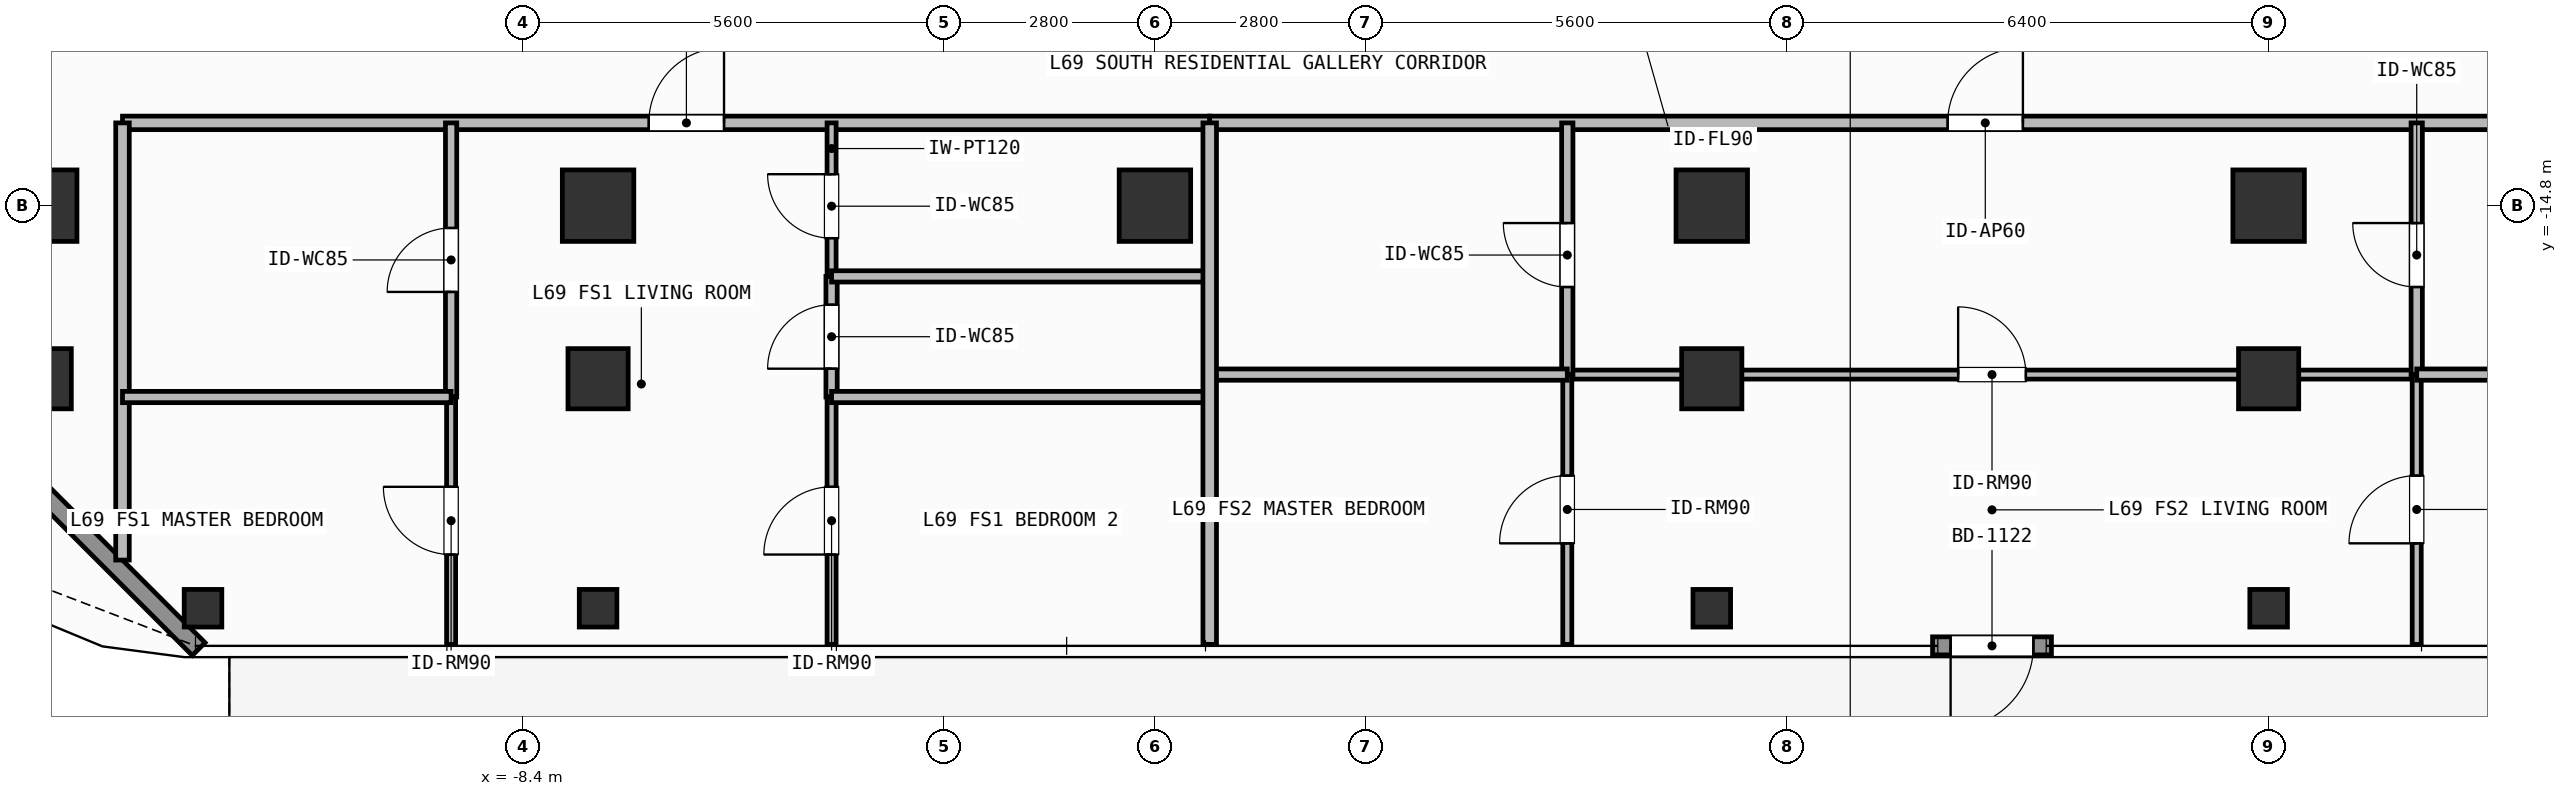
"""IFC4 building model, lengths in metres.
Left out: names, types, materials, properties, quantities, classifications, styles, units other than length and angle.
Written with IfcOpenShell. Run it as: python <this file> out.ifc"""

import sys

from ifc_helpers import new_model, si_unit, direction, frame, frame_2d, origin, origin_2d, place, context, subcontext, project, spatial, rectangle, hollow_rectangle, extrude, element, fill, save


model = new_model("IFC4")
c1 = context("Model", 3, precision=1e-05, world=origin(), true_north=direction((0.0, 1.0)))
c2 = subcontext(c1, "Body", "Model", "MODEL_VIEW")
j1 = project(units=[si_unit("LENGTHUNIT", "METRE"), si_unit("PLANEANGLEUNIT", "RADIAN")], contexts=[c1])
p1 = place(None, origin())
s1 = spatial("IfcSite", under=j1, at=p1, CompositionType="ELEMENT")
p2 = place(p1, origin())
s2 = spatial("IfcBuilding", under=s1, at=p2, CompositionType="ELEMENT")
p3 = place(p2, frame((0.0, 0.0, 282.0)))
s3 = spatial("IfcBuildingStorey", under=s2, at=p3, CompositionType="ELEMENT", Elevation=282.0)
for number, where, z_axis, x_axis in (
    (1, (-14.8, -14.8, 0.0), (0.0, 0.0, 1.0), (1.0, 0.0, 0.0)),
    (2, (-7.4, -14.8, 0.0), (0.0, 0.0, 1.0), (1.0, 0.0, 0.0)),
    (3, (0.0, -14.8, 0.0), (0.0, 0.0, 1.0), (1.0, 0.0, 0.0)),
    (4, (7.4, -14.8, 0.0), (0.0, 0.0, 1.0), (1.0, 0.0, 0.0)),
    (5, (14.8, -14.8, 0.0), (0.0, 0.0, 1.0), (1.0, 0.0, 0.0)),
):
    element("IfcColumn", number, at=place(p3, frame(where, z_axis=z_axis, x_axis=x_axis)), inside=s3, PredefinedType="COLUMN", context=c2, shape_type="SweptSolid", body=[
        extrude(rectangle(XDim=0.95, YDim=0.95, at=origin_2d()), origin(), (0.0, 0.0, 1.0), 3.9),
    ])
for number, where, z_axis, x_axis in (
    (6, (-14.8, -17.1, 0.0), (0.0, 0.0, 1.0), (1.0, 0.0, 0.0)),
    (7, (-7.4, -17.1, 0.0), (0.0, 0.0, 1.0), (1.0, 0.0, 0.0)),
    (8, (7.4, -17.1, 0.0), (0.0, 0.0, 1.0), (1.0, 0.0, 0.0)),
    (9, (14.8, -17.1, 0.0), (0.0, 0.0, 1.0), (1.0, 0.0, 0.0)),
):
    element("IfcColumn", number, at=place(p3, frame(where, z_axis=z_axis, x_axis=x_axis)), inside=s3, PredefinedType="COLUMN", context=c2, shape_type="SweptSolid", body=[
        extrude(hollow_rectangle(XDim=0.8, YDim=0.8, WallThickness=0.036, at=origin_2d()), origin(), (0.0, 0.0, 1.0), 3.9),
    ])
for number, where, z_axis, x_axis in (
    (10, (-12.65, -20.15, 0.0), (0.0, 0.0, 1.0), (1.0, 0.0, 0.0)),
    (11, (-7.4, -20.15, 0.0), (0.0, 0.0, 1.0), (1.0, 0.0, 0.0)),
    (12, (7.4, -20.15, 0.0), (0.0, 0.0, 1.0), (1.0, 0.0, 0.0)),
    (13, (14.8, -20.15, 0.0), (0.0, 0.0, 1.0), (1.0, 0.0, 0.0)),
):
    element("IfcColumn", number, at=place(p3, frame(where, z_axis=z_axis, x_axis=x_axis)), inside=s3, PredefinedType="COLUMN", context=c2, shape_type="SweptSolid", body=[
        extrude(hollow_rectangle(XDim=0.5, YDim=0.5, WallThickness=0.025, at=origin_2d()), origin(), (0.0, 0.0, 1.0), 3.9),
    ])
p4 = place(p3, frame((11.914, -20.65, 0.0), z_axis=(0.0, 0.0, 1.0), x_axis=(-1.0, 0.0, 0.0)))
e14 = element("IfcWall", 14, at=p4, inside=s3, PredefinedType="SOLIDWALL", context=c2, shape_type="SweptSolid", body=[
    extrude(rectangle(XDim=1.58, YDim=0.24, at=frame_2d((0.79, 0.0))), origin(), (0.0, 0.0, 1.0), 3.62),
])
p5 = place(p4, frame((0.24, 0.0, 0.0)))
e15 = element("IfcOpeningElement", 15, at=p5, cuts=e14, PredefinedType="OPENING", context=c2, shape_type="SweptSolid", body=[
    extrude(rectangle(XDim=1.1, YDim=2.2, at=frame_2d((0.55, 1.1))), frame((0.0, 0.13, 0.0), z_axis=(0.0, -1.0, 0.0), x_axis=(1.0, 0.0, 0.0)), (0.0, 0.0, 1.0), 0.26),
])
p6 = place(p3, frame((-12.708, -20.692, 0.0), z_axis=(0.0, 0.0, 1.0), x_axis=(-0.707126925818, 0.707086635981, 0.0)))
e16 = element("IfcWall", 16, at=p6, inside=s3, PredefinedType="SOLIDWALL", context=c2, shape_type="SweptSolid", body=[
    extrude(rectangle(XDim=6.06, YDim=0.24, at=frame_2d((3.03, 0.0))), origin(), (0.0, 0.0, 1.0), 3.62),
])
p7 = place(p3, frame((-13.72, -13.7, 0.0), z_axis=(0.0, 0.0, 1.0), x_axis=(1.0, 0.0, 0.0)))
e17 = element("IfcWall", 17, at=p7, inside=s3, PredefinedType="PARTITIONING", context=c2, shape_type="SweptSolid", body=[
    extrude(rectangle(XDim=14.448, YDim=0.18, at=frame_2d((7.224, 0.0))), origin(), (0.0, 0.0, 1.0), 3.62),
])
p8 = place(p7, frame((6.994, 0.0, 0.0)))
e18 = element("IfcOpeningElement", 18, at=p8, cuts=e17, PredefinedType="OPENING", context=c2, shape_type="SweptSolid", body=[
    extrude(rectangle(XDim=1.0, YDim=2.2, at=frame_2d((0.5, 1.1))), frame((0.0, 0.1, 0.0), z_axis=(0.0, -1.0, 0.0), x_axis=(1.0, 0.0, 0.0)), (0.0, 0.0, 1.0), 0.2),
])
p9 = place(p3, frame((-9.353, -17.343, 0.0), z_axis=(0.0, 0.0, 1.0), x_axis=(0.0, 1.0, 0.0)))
e19 = element("IfcWall", 19, at=p9, inside=s3, PredefinedType="PARTITIONING", context=c2, shape_type="SweptSolid", body=[
    extrude(rectangle(XDim=3.643, YDim=0.15, at=frame_2d((1.822, 0.0))), origin(), (0.0, 0.0, 1.0), 3.62),
])
p10 = place(p9, frame((1.396, 0.0, 0.0)))
e20 = element("IfcOpeningElement", 20, at=p10, cuts=e19, PredefinedType="OPENING", context=c2, shape_type="SweptSolid", body=[
    extrude(rectangle(XDim=0.85, YDim=2.1, at=frame_2d((0.425, 1.05))), frame((0.0, 0.085, 0.0), z_axis=(0.0, -1.0, 0.0), x_axis=(1.0, 0.0, 0.0)), (0.0, 0.0, 1.0), 0.17),
])
p11 = place(p3, frame((-9.353, -20.63, 0.0), z_axis=(0.0, 0.0, 1.0), x_axis=(0.0, 1.0, 0.0)))
e21 = element("IfcWall", 21, at=p11, inside=s3, PredefinedType="PARTITIONING", context=c2, shape_type="SweptSolid", body=[
    extrude(rectangle(XDim=3.287, YDim=0.12, at=frame_2d((1.644, 0.0))), origin(), (0.0, 0.0, 1.0), 3.62),
])
p12 = place(p11, frame((1.194, 0.0, 0.0)))
e22 = element("IfcOpeningElement", 22, at=p12, cuts=e21, PredefinedType="OPENING", context=c2, shape_type="SweptSolid", body=[
    extrude(rectangle(XDim=0.9, YDim=2.1, at=frame_2d((0.45, 1.05))), frame((0.0, 0.07, 0.0), z_axis=(0.0, -1.0, 0.0), x_axis=(1.0, 0.0, 0.0)), (0.0, 0.0, 1.0), 0.14),
])
p13 = place(p3, frame((-4.297, -17.343, 0.0), z_axis=(0.0, 0.0, 1.0), x_axis=(0.0, 1.0, 0.0)))
e23 = element("IfcWall", 23, at=p13, inside=s3, PredefinedType="PARTITIONING", context=c2, shape_type="SweptSolid", body=[
    extrude(rectangle(XDim=1.603, YDim=0.15, at=frame_2d((0.802, 0.0))), origin(), (0.0, 0.0, 1.0), 3.62),
])
p14 = place(p13, frame((0.376, 0.0, 0.0)))
e24 = element("IfcOpeningElement", 24, at=p14, cuts=e23, PredefinedType="OPENING", context=c2, shape_type="SweptSolid", body=[
    extrude(rectangle(XDim=0.85, YDim=2.1, at=frame_2d((0.425, 1.05))), frame((0.0, 0.085, 0.0), z_axis=(0.0, -1.0, 0.0), x_axis=(1.0, 0.0, 0.0)), (0.0, 0.0, 1.0), 0.17),
])
p15 = place(p3, frame((-4.297, -15.74, 0.0), z_axis=(0.0, 0.0, 1.0), x_axis=(0.0, 1.0, 0.0)))
e25 = element("IfcWall", 25, at=p15, inside=s3, PredefinedType="PARTITIONING", context=c2, shape_type="SweptSolid", body=[
    extrude(rectangle(XDim=2.04, YDim=0.12, at=frame_2d((1.02, 0.0))), origin(), (0.0, 0.0, 1.0), 3.62),
])
p16 = place(p15, frame((0.508, 0.0, 0.0)))
e26 = element("IfcOpeningElement", 26, at=p16, cuts=e25, PredefinedType="OPENING", context=c2, shape_type="SweptSolid", body=[
    extrude(rectangle(XDim=0.85, YDim=2.1, at=frame_2d((0.425, 1.05))), frame((0.0, 0.07, 0.0), z_axis=(0.0, -1.0, 0.0), x_axis=(1.0, 0.0, 0.0)), (0.0, 0.0, 1.0), 0.14),
])
p17 = place(p3, frame((-4.297, -20.63, 0.0), z_axis=(0.0, 0.0, 1.0), x_axis=(0.0, 1.0, 0.0)))
e27 = element("IfcWall", 27, at=p17, inside=s3, PredefinedType="PARTITIONING", context=c2, shape_type="SweptSolid", body=[
    extrude(rectangle(XDim=3.287, YDim=0.12, at=frame_2d((1.644, 0.0))), origin(), (0.0, 0.0, 1.0), 3.62),
])
p18 = place(p17, frame((1.194, 0.0, 0.0)))
e28 = element("IfcOpeningElement", 28, at=p18, cuts=e27, PredefinedType="OPENING", context=c2, shape_type="SweptSolid", body=[
    extrude(rectangle(XDim=0.9, YDim=2.1, at=frame_2d((0.45, 1.05))), frame((0.0, 0.07, 0.0), z_axis=(0.0, -1.0, 0.0), x_axis=(1.0, 0.0, 0.0)), (0.0, 0.0, 1.0), 0.14),
])
p19 = place(p3, frame((0.728, -13.7, 0.0), z_axis=(0.0, 0.0, 1.0), x_axis=(1.0, 0.0, 0.0)))
e29 = element("IfcWall", 29, at=p19, inside=s3, PredefinedType="PARTITIONING", context=c2, shape_type="SweptSolid", body=[
    extrude(rectangle(XDim=20.792, YDim=0.18, at=frame_2d((10.396, 0.0))), origin(), (0.0, 0.0, 1.0), 3.62),
])
p20 = place(p19, frame((9.807, 0.0, 0.0)))
e30 = element("IfcOpeningElement", 30, at=p20, cuts=e29, PredefinedType="OPENING", context=c2, shape_type="SweptSolid", body=[
    extrude(rectangle(XDim=1.0, YDim=2.2, at=frame_2d((0.5, 1.1))), frame((0.0, 0.1, 0.0), z_axis=(0.0, -1.0, 0.0), x_axis=(1.0, 0.0, 0.0)), (0.0, 0.0, 1.0), 0.2),
])
p21 = place(p3, frame((5.48, -17.045, 0.0), z_axis=(0.0, 0.0, 1.0), x_axis=(1.0, 0.0, 0.0)))
e31 = element("IfcWall", 31, at=p21, inside=s3, PredefinedType="PARTITIONING", context=c2, shape_type="SweptSolid", body=[
    extrude(rectangle(XDim=11.288, YDim=0.12, at=frame_2d((5.644, 0.0))), origin(), (0.0, 0.0, 1.0), 2.71),
])
p22 = place(p21, frame((5.194, 0.0, 0.0)))
e32 = element("IfcOpeningElement", 32, at=p22, cuts=e31, PredefinedType="OPENING", context=c2, shape_type="SweptSolid", body=[
    extrude(rectangle(XDim=0.9, YDim=2.1, at=frame_2d((0.45, 1.05))), frame((0.0, 0.07, 0.0), z_axis=(0.0, -1.0, 0.0), x_axis=(1.0, 0.0, 0.0)), (0.0, 0.0, 1.0), 0.14),
])
p23 = place(p3, frame((5.48, -17.045, 0.0), z_axis=(0.0, 0.0, 1.0), x_axis=(0.0, 1.0, 0.0)))
e33 = element("IfcWall", 33, at=p23, inside=s3, PredefinedType="PARTITIONING", context=c2, shape_type="SweptSolid", body=[
    extrude(rectangle(XDim=3.345, YDim=0.15, at=frame_2d((1.672, 0.0))), origin(), (0.0, 0.0, 1.0), 3.62),
])
p24 = place(p23, frame((1.164, 0.0, 0.0)))
e34 = element("IfcOpeningElement", 34, at=p24, cuts=e33, PredefinedType="OPENING", context=c2, shape_type="SweptSolid", body=[
    extrude(rectangle(XDim=0.85, YDim=2.1, at=frame_2d((0.425, 1.05))), frame((0.0, 0.085, 0.0), z_axis=(0.0, -1.0, 0.0), x_axis=(1.0, 0.0, 0.0)), (0.0, 0.0, 1.0), 0.17),
])
p25 = place(p3, frame((5.48, -20.63, 0.0), z_axis=(0.0, 0.0, 1.0), x_axis=(0.0, 1.0, 0.0)))
e35 = element("IfcWall", 35, at=p25, inside=s3, PredefinedType="PARTITIONING", context=c2, shape_type="SweptSolid", body=[
    extrude(rectangle(XDim=3.585, YDim=0.12, at=frame_2d((1.792, 0.0))), origin(), (0.0, 0.0, 1.0), 3.62),
])
p26 = place(p25, frame((1.343, 0.0, 0.0)))
e36 = element("IfcOpeningElement", 36, at=p26, cuts=e35, PredefinedType="OPENING", context=c2, shape_type="SweptSolid", body=[
    extrude(rectangle(XDim=0.9, YDim=2.1, at=frame_2d((0.45, 1.05))), frame((0.0, 0.07, 0.0), z_axis=(0.0, -1.0, 0.0), x_axis=(1.0, 0.0, 0.0)), (0.0, 0.0, 1.0), 0.14),
])
p27 = place(p3, frame((16.768, -17.045, 0.0), z_axis=(0.0, 0.0, 1.0), x_axis=(0.0, 1.0, 0.0)))
e37 = element("IfcWall", 37, at=p27, inside=s3, PredefinedType="PARTITIONING", context=c2, shape_type="SweptSolid", body=[
    extrude(rectangle(XDim=3.345, YDim=0.15, at=frame_2d((1.672, 0.0))), origin(), (0.0, 0.0, 1.0), 3.62),
])
p28 = place(p27, frame((1.164, 0.0, 0.0)))
e38 = element("IfcOpeningElement", 38, at=p28, cuts=e37, PredefinedType="OPENING", context=c2, shape_type="SweptSolid", body=[
    extrude(rectangle(XDim=0.85, YDim=2.1, at=frame_2d((0.425, 1.05))), frame((0.0, 0.085, 0.0), z_axis=(0.0, -1.0, 0.0), x_axis=(1.0, 0.0, 0.0)), (0.0, 0.0, 1.0), 0.17),
])
p29 = place(p3, frame((16.768, -20.63, 0.0), z_axis=(0.0, 0.0, 1.0), x_axis=(0.0, 1.0, 0.0)))
e39 = element("IfcWall", 39, at=p29, inside=s3, PredefinedType="PARTITIONING", context=c2, shape_type="SweptSolid", body=[
    extrude(rectangle(XDim=3.585, YDim=0.12, at=frame_2d((1.792, 0.0))), origin(), (0.0, 0.0, 1.0), 3.62),
])
p30 = place(p29, frame((1.343, 0.0, 0.0)))
e40 = element("IfcOpeningElement", 40, at=p30, cuts=e39, PredefinedType="OPENING", context=c2, shape_type="SweptSolid", body=[
    extrude(rectangle(XDim=0.9, YDim=2.1, at=frame_2d((0.45, 1.05))), frame((0.0, 0.07, 0.0), z_axis=(0.0, -1.0, 0.0), x_axis=(1.0, 0.0, 0.0)), (0.0, 0.0, 1.0), 0.14),
])
p31 = place(p3, frame((-13.72, -19.51, 0.0), z_axis=(0.0, 0.0, 1.0), x_axis=(0.0, 1.0, 0.0)))
e41 = element("IfcWall", 41, at=p31, inside=s3, PredefinedType="PARTITIONING", context=c2, shape_type="SweptSolid", body=[
    extrude(rectangle(XDim=5.81, YDim=0.18, at=frame_2d((2.905, 0.0))), origin(), (0.0, 0.0, 1.0), 3.62),
])
p32 = place(p3, frame((-13.72, -17.343, 0.0), z_axis=(0.0, 0.0, 1.0), x_axis=(1.0, 0.0, 0.0)))
e42 = element("IfcWall", 42, at=p32, inside=s3, PredefinedType="PARTITIONING", context=c2, shape_type="SweptSolid", body=[
    extrude(rectangle(XDim=4.367, YDim=0.15, at=frame_2d((2.184, 0.0))), origin(), (0.0, 0.0, 1.0), 2.71),
])
p33 = place(p3, frame((-4.297, -15.74, 0.0), z_axis=(0.0, 0.0, 1.0), x_axis=(1.0, 0.0, 0.0)))
e43 = element("IfcWall", 43, at=p33, inside=s3, PredefinedType="PARTITIONING", context=c2, shape_type="SweptSolid", body=[
    extrude(rectangle(XDim=5.025, YDim=0.15, at=frame_2d((2.513, 0.0))), origin(), (0.0, 0.0, 1.0), 3.62),
])
p34 = place(p3, frame((-4.297, -17.343, 0.0), z_axis=(0.0, 0.0, 1.0), x_axis=(1.0, 0.0, 0.0)))
e44 = element("IfcWall", 44, at=p34, inside=s3, PredefinedType="PARTITIONING", context=c2, shape_type="SweptSolid", body=[
    extrude(rectangle(XDim=5.025, YDim=0.15, at=frame_2d((2.513, 0.0))), origin(), (0.0, 0.0, 1.0), 2.71),
])
p35 = place(p3, frame((0.728, -17.045, 0.0), z_axis=(0.0, 0.0, 1.0), x_axis=(1.0, 0.0, 0.0)))
e45 = element("IfcWall", 45, at=p35, inside=s3, PredefinedType="PARTITIONING", context=c2, shape_type="SweptSolid", body=[
    extrude(rectangle(XDim=4.752, YDim=0.15, at=frame_2d((2.376, 0.0))), origin(), (0.0, 0.0, 1.0), 2.71),
])
p36 = place(p3, frame((16.768, -17.045, 0.0), z_axis=(0.0, 0.0, 1.0), x_axis=(1.0, 0.0, 0.0)))
e46 = element("IfcWall", 46, at=p36, inside=s3, PredefinedType="PARTITIONING", context=c2, shape_type="SweptSolid", body=[
    extrude(rectangle(XDim=4.752, YDim=0.15, at=frame_2d((2.376, 0.0))), origin(), (0.0, 0.0, 1.0), 3.62),
])
p37 = place(p3, frame((0.728, -20.63, 0.0), z_axis=(0.0, 0.0, 1.0), x_axis=(0.0, 1.0, 0.0)))
e47 = element("IfcWall", 47, at=p37, inside=s3, PredefinedType="PARTITIONING", context=c2, shape_type="SweptSolid", body=[
    extrude(rectangle(XDim=6.93, YDim=0.18, at=frame_2d((3.465, 0.0))), origin(), (0.0, 0.0, 1.0), 3.62),
])
p38 = place(p5, origin())
e48 = element("IfcDoor", 48, at=p38, inside=s3, OperationType="SINGLE_SWING_RIGHT", PredefinedType="DOOR", context=c2, shape_type="SweptSolid", body=[
    extrude(rectangle(XDim=1.1, YDim=2.2, at=frame_2d((0.55, 1.1))), frame((0.0, 0.025, 0.0), z_axis=(0.0, -1.0, 0.0), x_axis=(1.0, 0.0, 0.0)), (0.0, 0.0, 1.0), 0.05),
])
fill(e15, e48)
p39 = place(p8, origin())
e49 = element("IfcDoor", 49, at=p39, inside=s3, OperationType="SINGLE_SWING_RIGHT", PredefinedType="DOOR", context=c2, shape_type="SweptSolid", body=[
    extrude(rectangle(XDim=1.0, YDim=2.2, at=frame_2d((0.5, 1.1))), frame((0.0, 0.025, 0.0), z_axis=(0.0, -1.0, 0.0), x_axis=(1.0, 0.0, 0.0)), (0.0, 0.0, 1.0), 0.05),
])
fill(e18, e49)
p40 = place(p10, origin())
e50 = element("IfcDoor", 50, at=p40, inside=s3, OperationType="SINGLE_SWING_LEFT", PredefinedType="DOOR", context=c2, shape_type="SweptSolid", body=[
    extrude(rectangle(XDim=0.85, YDim=2.1, at=frame_2d((0.425, 1.05))), frame((0.0, 0.025, 0.0), z_axis=(0.0, -1.0, 0.0), x_axis=(1.0, 0.0, 0.0)), (0.0, 0.0, 1.0), 0.05),
])
fill(e20, e50)
p41 = place(p12, origin())
e51 = element("IfcDoor", 51, at=p41, inside=s3, OperationType="SINGLE_SWING_RIGHT", PredefinedType="DOOR", context=c2, shape_type="SweptSolid", body=[
    extrude(rectangle(XDim=0.9, YDim=2.1, at=frame_2d((0.45, 1.05))), frame((0.0, 0.025, 0.0), z_axis=(0.0, -1.0, 0.0), x_axis=(1.0, 0.0, 0.0)), (0.0, 0.0, 1.0), 0.05),
])
fill(e22, e51)
p42 = place(p14, origin())
e52 = element("IfcDoor", 52, at=p42, inside=s3, OperationType="SINGLE_SWING_LEFT", PredefinedType="DOOR", context=c2, shape_type="SweptSolid", body=[
    extrude(rectangle(XDim=0.85, YDim=2.1, at=frame_2d((0.425, 1.05))), frame((0.0, 0.025, 0.0), z_axis=(0.0, -1.0, 0.0), x_axis=(1.0, 0.0, 0.0)), (0.0, 0.0, 1.0), 0.05),
])
fill(e24, e52)
p43 = place(p16, origin())
e53 = element("IfcDoor", 53, at=p43, inside=s3, OperationType="SINGLE_SWING_RIGHT", PredefinedType="DOOR", context=c2, shape_type="SweptSolid", body=[
    extrude(rectangle(XDim=0.85, YDim=2.1, at=frame_2d((0.425, 1.05))), frame((0.0, 0.025, 0.0), z_axis=(0.0, -1.0, 0.0), x_axis=(1.0, 0.0, 0.0)), (0.0, 0.0, 1.0), 0.05),
])
fill(e26, e53)
p44 = place(p18, origin())
e54 = element("IfcDoor", 54, at=p44, inside=s3, OperationType="SINGLE_SWING_LEFT", PredefinedType="DOOR", context=c2, shape_type="SweptSolid", body=[
    extrude(rectangle(XDim=0.9, YDim=2.1, at=frame_2d((0.45, 1.05))), frame((0.0, 0.025, 0.0), z_axis=(0.0, -1.0, 0.0), x_axis=(1.0, 0.0, 0.0)), (0.0, 0.0, 1.0), 0.05),
])
fill(e28, e54)
p45 = place(p20, origin())
e55 = element("IfcDoor", 55, at=p45, inside=s3, OperationType="SINGLE_SWING_RIGHT", PredefinedType="DOOR", context=c2, shape_type="SweptSolid", body=[
    extrude(rectangle(XDim=1.0, YDim=2.2, at=frame_2d((0.5, 1.1))), frame((0.0, 0.025, 0.0), z_axis=(0.0, -1.0, 0.0), x_axis=(1.0, 0.0, 0.0)), (0.0, 0.0, 1.0), 0.05),
])
fill(e30, e55)
p46 = place(p22, origin())
e56 = element("IfcDoor", 56, at=p46, inside=s3, OperationType="SINGLE_SWING_LEFT", PredefinedType="DOOR", context=c2, shape_type="SweptSolid", body=[
    extrude(rectangle(XDim=0.9, YDim=2.1, at=frame_2d((0.45, 1.05))), frame((0.0, 0.025, 0.0), z_axis=(0.0, -1.0, 0.0), x_axis=(1.0, 0.0, 0.0)), (0.0, 0.0, 1.0), 0.05),
])
fill(e32, e56)
p47 = place(p24, origin())
e57 = element("IfcDoor", 57, at=p47, inside=s3, OperationType="SINGLE_SWING_RIGHT", PredefinedType="DOOR", context=c2, shape_type="SweptSolid", body=[
    extrude(rectangle(XDim=0.85, YDim=2.1, at=frame_2d((0.425, 1.05))), frame((0.0, 0.025, 0.0), z_axis=(0.0, -1.0, 0.0), x_axis=(1.0, 0.0, 0.0)), (0.0, 0.0, 1.0), 0.05),
])
fill(e34, e57)
p48 = place(p26, origin())
e58 = element("IfcDoor", 58, at=p48, inside=s3, OperationType="SINGLE_SWING_LEFT", PredefinedType="DOOR", context=c2, shape_type="SweptSolid", body=[
    extrude(rectangle(XDim=0.9, YDim=2.1, at=frame_2d((0.45, 1.05))), frame((0.0, 0.025, 0.0), z_axis=(0.0, -1.0, 0.0), x_axis=(1.0, 0.0, 0.0)), (0.0, 0.0, 1.0), 0.05),
])
fill(e36, e58)
p49 = place(p28, origin())
e59 = element("IfcDoor", 59, at=p49, inside=s3, OperationType="SINGLE_SWING_RIGHT", PredefinedType="DOOR", context=c2, shape_type="SweptSolid", body=[
    extrude(rectangle(XDim=0.85, YDim=2.1, at=frame_2d((0.425, 1.05))), frame((0.0, 0.025, 0.0), z_axis=(0.0, -1.0, 0.0), x_axis=(1.0, 0.0, 0.0)), (0.0, 0.0, 1.0), 0.05),
])
fill(e38, e59)
p50 = place(p30, origin())
e60 = element("IfcDoor", 60, at=p50, inside=s3, OperationType="SINGLE_SWING_LEFT", PredefinedType="DOOR", context=c2, shape_type="SweptSolid", body=[
    extrude(rectangle(XDim=0.9, YDim=2.1, at=frame_2d((0.45, 1.05))), frame((0.0, 0.025, 0.0), z_axis=(0.0, -1.0, 0.0), x_axis=(1.0, 0.0, 0.0)), (0.0, 0.0, 1.0), 0.05),
])
fill(e40, e60)
save(model, sys.argv[1])
